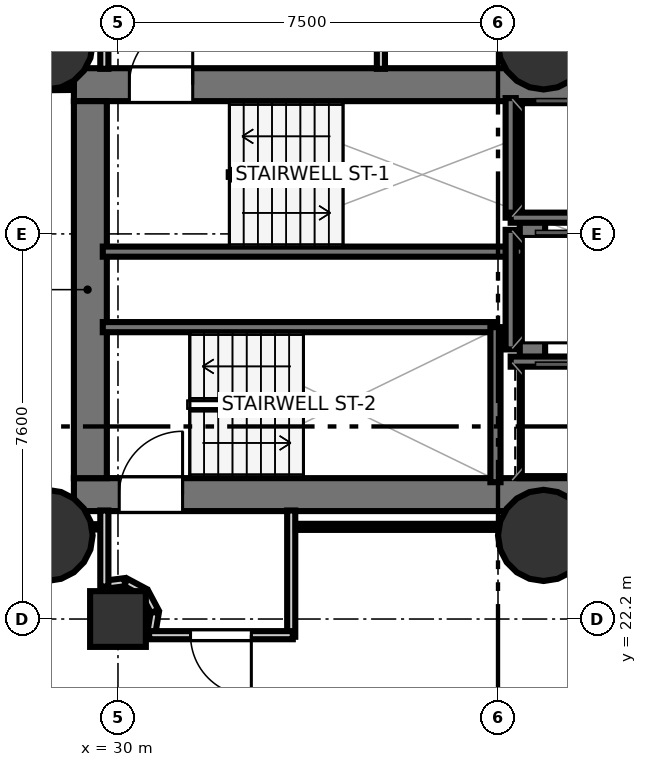
"""IFC4 building model, lengths in metres.
Left out: names, types, materials, properties, quantities, classifications, styles, units other than length and angle.
Written with IfcOpenShell. Run it as: python <this file> out.ifc"""

import sys

from ifc_helpers import new_model, si_unit, direction, frame, frame_2d, origin, origin_2d, place, context, subcontext, project, spatial, rectangle, hollow_circle, extrude, element, fill, save


model = new_model("IFC4")
c1 = context("Model", 3, precision=1e-05, world=origin(), true_north=direction((0.0, 1.0)))
c2 = subcontext(c1, "Body", "Model", "MODEL_VIEW")
j1 = project(units=[si_unit("LENGTHUNIT", "METRE"), si_unit("PLANEANGLEUNIT", "RADIAN")], contexts=[c1])
p1 = place(None, origin())
s1 = spatial("IfcSite", under=j1, at=p1, CompositionType="ELEMENT")
p2 = place(p1, origin())
s2 = spatial("IfcBuilding", under=s1, at=p2, CompositionType="ELEMENT")
p3 = place(p2, origin())
s3 = spatial("IfcBuildingStorey", under=s2, at=p3, CompositionType="ELEMENT", Elevation=0.0)
p4 = place(p3, frame((29.13, 32.745, 0.0), z_axis=(0.0, 0.0, 1.0), x_axis=(1.0, 0.0, 0.0)))
e1 = element("IfcWall", 1, at=p4, inside=s3, PredefinedType="SHEAR", context=c2, shape_type="SweptSolid", body=[
    extrude(rectangle(XDim=10.72, YDim=0.65, at=frame_2d((5.36, 0.0))), origin(), (0.0, 0.0, 1.0), 5.78),
])
p5 = place(p4, frame((1.095, 0.0, 0.0)))
e2 = element("IfcOpeningElement", 2, at=p5, cuts=e1, PredefinedType="OPENING", context=c2, shape_type="SweptSolid", body=[
    extrude(rectangle(XDim=1.25, YDim=2.15, at=frame_2d((0.625, 1.075))), frame((0.0, 0.335, 0.0), z_axis=(0.0, -1.0, 0.0), x_axis=(1.0, 0.0, 0.0)), (0.0, 0.0, 1.0), 0.67),
])
p6 = place(p3, frame((29.13, 24.655, 0.0), z_axis=(0.0, 0.0, 1.0), x_axis=(1.0, 0.0, 0.0)))
e3 = element("IfcWall", 3, at=p6, inside=s3, PredefinedType="SHEAR", context=c2, shape_type="SweptSolid", body=[
    extrude(rectangle(XDim=10.72, YDim=0.65, at=frame_2d((5.36, 0.0))), origin(), (0.0, 0.0, 1.0), 5.78),
])
p7 = place(p6, frame((0.895, 0.0, 0.0)))
e4 = element("IfcOpeningElement", 4, at=p7, cuts=e3, PredefinedType="OPENING", context=c2, shape_type="SweptSolid", body=[
    extrude(rectangle(XDim=1.25, YDim=2.15, at=frame_2d((0.625, 1.075))), frame((0.0, 0.335, 0.0), z_axis=(0.0, -1.0, 0.0), x_axis=(1.0, 0.0, 0.0)), (0.0, 0.0, 1.0), 0.67),
])
p8 = place(p3, frame((29.455, 24.98, 0.0), z_axis=(0.0, 0.0, 1.0), x_axis=(0.0, 1.0, 0.0)))
e5 = element("IfcWall", 5, at=p8, inside=s3, PredefinedType="SHEAR", context=c2, shape_type="SweptSolid", body=[
    extrude(rectangle(XDim=7.44, YDim=0.65, at=frame_2d((3.72, 0.0))), origin(), (0.0, 0.0, 1.0), 5.78),
])
p9 = place(p3, frame((38.18, 24.98, 0.0), z_axis=(0.0, 0.0, 1.0), x_axis=(0.0, 1.0, 0.0)))
e6 = element("IfcWall", 6, at=p9, inside=s3, PredefinedType="SHEAR", context=c2, shape_type="SweptSolid", body=[
    extrude(rectangle(XDim=7.44, YDim=0.5, at=frame_2d((3.72, 0.0))), origin(), (0.0, 0.0, 1.0), 5.78),
])
for number, where, z_axis, x_axis in (
    (7, (28.6, 33.55, 0.0), (0.0, 0.0, 1.0), (1.0, 0.0, 0.0)),
    (8, (28.6, 23.85, 0.0), (0.0, 0.0, 1.0), (1.0, 0.0, 0.0)),
    (9, (38.4, 33.55, 0.0), (0.0, 0.0, 1.0), (1.0, 0.0, 0.0)),
    (10, (38.4, 23.85, 0.0), (0.0, 0.0, 1.0), (1.0, 0.0, 0.0)),
):
    element("IfcColumn", number, at=place(p3, frame(where, z_axis=z_axis, x_axis=x_axis)), inside=s3, PredefinedType="COLUMN", context=c2, shape_type="SweptSolid", body=[
        extrude(hollow_circle(Radius=0.9, WallThickness=0.045, at=origin_2d()), origin(), (0.0, 0.0, 1.0), 6.0),
    ])
p10 = place(p3, frame((30.0, 22.2, 0.0), z_axis=(0.0, 0.0, 1.0), x_axis=(1.0, 0.0, 0.0)))
e11 = element("IfcColumn", 11, at=p10, inside=s3, PredefinedType="COLUMN", context=c2, shape_type="SweptSolid", body=[
    extrude(rectangle(XDim=1.1, YDim=1.1, at=origin_2d()), origin(), (0.0, 0.0, 1.0), 6.0),
])
p11 = place(p3, frame((29.7, 29.45, 0.0), z_axis=(0.0, 0.0, 1.0), x_axis=(1.0, 0.0, 0.0)))
e12 = element("IfcWall", 12, at=p11, inside=s3, PredefinedType="SOLIDWALL", context=c2, shape_type="SweptSolid", body=[
    extrude(rectangle(XDim=8.3, YDim=0.2, at=frame_2d((4.15, 0.0))), origin(), (0.0, 0.0, 1.0), 5.78),
])
p12 = place(p3, frame((29.7, 27.96, 0.0), z_axis=(0.0, 0.0, 1.0), x_axis=(1.0, 0.0, 0.0)))
e13 = element("IfcWall", 13, at=p12, inside=s3, PredefinedType="SOLIDWALL", context=c2, shape_type="SweptSolid", body=[
    extrude(rectangle(XDim=7.75, YDim=0.2, at=frame_2d((3.875, 0.0))), origin(), (0.0, 0.0, 1.0), 5.78),
])
p13 = place(p3, frame((37.45, 24.9, 0.0), z_axis=(0.0, 0.0, 1.0), x_axis=(0.0, 1.0, 0.0)))
e14 = element("IfcWall", 14, at=p13, inside=s3, PredefinedType="SOLIDWALL", context=c2, shape_type="SweptSolid", body=[
    extrude(rectangle(XDim=3.06, YDim=0.2, at=frame_2d((1.53, 0.0))), origin(), (0.0, 0.0, 1.0), 5.78),
])
p14 = place(p3, frame((37.75, 30.12, 0.0), z_axis=(0.0, 0.0, 1.0), x_axis=(0.0, 1.0, 0.0)))
e15 = element("IfcWall", 15, at=p14, inside=s3, PredefinedType="SOLIDWALL", context=c2, shape_type="SweptSolid", body=[
    extrude(rectangle(XDim=2.36, YDim=0.2, at=frame_2d((1.18, 0.0))), origin(), (0.0, 0.0, 1.0), 5.78),
])
for number, where, z_axis, x_axis in (
    (16, (37.75, 30.12, 0.0), (0.0, 0.0, 1.0), (1.0, 0.0, 0.0)),
    (17, (37.75, 27.28, 0.0), (0.0, 0.0, 1.0), (1.0, 0.0, 0.0)),
):
    element("IfcWall", number, at=place(p3, frame(where, z_axis=z_axis, x_axis=x_axis)), inside=s3, PredefinedType="SOLIDWALL", context=c2, shape_type="SweptSolid", body=[
        extrude(rectangle(XDim=2.1, YDim=0.2, at=frame_2d((1.05, 0.0))), origin(), (0.0, 0.0, 1.0), 5.78),
    ])
p15 = place(p3, frame((37.75, 27.52, 0.0), z_axis=(0.0, 0.0, 1.0), x_axis=(0.0, 1.0, 0.0)))
e18 = element("IfcWall", 18, at=p15, inside=s3, PredefinedType="SOLIDWALL", context=c2, shape_type="SweptSolid", body=[
    extrude(rectangle(XDim=2.36, YDim=0.2, at=frame_2d((1.18, 0.0))), origin(), (0.0, 0.0, 1.0), 5.78),
])
for number, where, z_axis, x_axis in (
    (19, (29.731, 33.058, 0.0), (0.0, 0.0, 1.0), (0.0, 1.0, 0.0)),
    (20, (35.189, 38.1, 0.0), (0.0, 0.0, 1.0), (0.0, -1.0, 0.0)),
):
    element("IfcWall", number, at=place(p3, frame(where, z_axis=z_axis, x_axis=x_axis)), inside=s3, PredefinedType="PARTITIONING", context=c2, shape_type="SweptSolid", body=[
        extrude(rectangle(XDim=5.042, YDim=0.16, at=frame_2d((2.521, 0.0))), origin(), (0.0, 0.0, 1.0), 5.1),
    ])
p16 = place(p3, frame((30.645, 21.845, 0.0), z_axis=(0.0, 0.0, 1.0), x_axis=(0.16559769087, 0.986193391165, 0.0)))
e21 = element("IfcWall", 21, at=p16, inside=s3, PredefinedType="PARTITIONING", context=c2, shape_type="SweptSolid", body=[
    extrude(rectangle(XDim=0.495, YDim=0.16, at=frame_2d((0.248, 0.0))), origin(), (0.0, 0.0, 1.0), 5.1),
])
p17 = place(p3, frame((30.724, 22.353, 0.0), z_axis=(0.0, 0.0, 1.0), x_axis=(-0.471202615726, 0.882024996773, 0.0)))
e22 = element("IfcWall", 22, at=p17, inside=s3, PredefinedType="PARTITIONING", context=c2, shape_type="SweptSolid", body=[
    extrude(rectangle(XDim=0.412, YDim=0.16, at=frame_2d((0.206, 0.0))), origin(), (0.0, 0.0, 1.0), 5.1),
])
p18 = place(p3, frame((30.517, 22.729, 0.0), z_axis=(0.0, 0.0, 1.0), x_axis=(-0.882139655073, 0.470987928665, 0.0)))
e23 = element("IfcWall", 23, at=p18, inside=s3, PredefinedType="PARTITIONING", context=c2, shape_type="SweptSolid", body=[
    extrude(rectangle(XDim=0.412, YDim=0.16, at=frame_2d((0.206, 0.0))), origin(), (0.0, 0.0, 1.0), 5.1),
])
p19 = place(p3, frame((30.135, 22.927, 0.0), z_axis=(0.0, 0.0, 1.0), x_axis=(-0.992106976416, -0.125394367286, 0.0)))
e24 = element("IfcWall", 24, at=p19, inside=s3, PredefinedType="PARTITIONING", context=c2, shape_type="SweptSolid", body=[
    extrude(rectangle(XDim=0.442, YDim=0.16, at=frame_2d((0.221, 0.0))), origin(), (0.0, 0.0, 1.0), 5.1),
])
p20 = place(p3, frame((29.731, 22.841, 0.0), z_axis=(0.0, 0.0, 1.0), x_axis=(0.0, 1.0, 0.0)))
e25 = element("IfcWall", 25, at=p20, inside=s3, PredefinedType="PARTITIONING", context=c2, shape_type="SweptSolid", body=[
    extrude(rectangle(XDim=1.501, YDim=0.16, at=frame_2d((0.75, 0.0))), origin(), (0.0, 0.0, 1.0), 5.1),
])
p21 = place(p3, frame((33.419, 24.342, 0.0), z_axis=(0.0, 0.0, 1.0), x_axis=(0.0, -1.0, 0.0)))
e26 = element("IfcWall", 26, at=p21, inside=s3, PredefinedType="PARTITIONING", context=c2, shape_type="SweptSolid", body=[
    extrude(rectangle(XDim=2.492, YDim=0.16, at=frame_2d((1.246, 0.0))), origin(), (0.0, 0.0, 1.0), 5.1),
])
p22 = place(p3, frame((33.45, 21.881, 0.0), z_axis=(0.0, 0.0, 1.0), x_axis=(-1.0, 0.0, 0.0)))
e27 = element("IfcWall", 27, at=p22, inside=s3, PredefinedType="PARTITIONING", context=c2, shape_type="SweptSolid", body=[
    extrude(rectangle(XDim=2.836, YDim=0.16, at=frame_2d((1.418, 0.0))), origin(), (0.0, 0.0, 1.0), 5.1),
])
p23 = place(p22, frame((0.818, 0.0, 0.0)))
e28 = element("IfcOpeningElement", 28, at=p23, cuts=e27, PredefinedType="OPENING", context=c2, shape_type="SweptSolid", body=[
    extrude(rectangle(XDim=1.2, YDim=2.15, at=frame_2d((0.6, 1.075))), frame((0.0, 0.09, 0.0), z_axis=(0.0, -1.0, 0.0), x_axis=(1.0, 0.0, 0.0)), (0.0, 0.0, 1.0), 0.18),
])
p24 = place(p3, frame((29.13, 32.701, 0.0), z_axis=(0.0, 0.0, 1.0), x_axis=(-0.999941987134, -0.010771367904, 0.0)))
e29 = element("IfcWall", 29, at=p24, inside=s3, PredefinedType="PARTITIONING", context=c2, shape_type="SweptSolid", body=[
    extrude(rectangle(XDim=0.68, YDim=0.12, at=frame_2d((0.34, 0.0))), origin(), (0.0, 0.0, 1.0), 5.1),
])
p25 = place(p3, frame((28.48, 24.019, 0.0), z_axis=(0.0, 0.0, 1.0), x_axis=(1.0, 0.0, 0.0)))
e30 = element("IfcWall", 30, at=p25, inside=s3, PredefinedType="PARTITIONING", context=c2, shape_type="SweptSolid", body=[
    extrude(rectangle(XDim=1.158, YDim=0.105, at=frame_2d((0.579, 0.0))), origin(), (0.0, 0.0, 1.0), 5.1),
])
p26 = place(p3, frame((33.512, 24.019, 0.0), z_axis=(0.0, 0.0, 1.0), x_axis=(1.0, 0.0, 0.0)))
e31 = element("IfcWall", 31, at=p26, inside=s3, PredefinedType="PARTITIONING", context=c2, shape_type="SweptSolid", body=[
    extrude(rectangle(XDim=6.308, YDim=0.12, at=frame_2d((3.154, 0.0))), origin(), (0.0, 0.0, 1.0), 5.1),
])
p27 = place(p5, origin())
e32 = element("IfcDoor", 32, at=p27, inside=s3, OperationType="SINGLE_SWING_RIGHT", PredefinedType="DOOR", context=c2, shape_type="SweptSolid", body=[
    extrude(rectangle(XDim=1.25, YDim=2.15, at=frame_2d((0.625, 1.075))), frame((0.0, 0.025, 0.0), z_axis=(0.0, -1.0, 0.0), x_axis=(1.0, 0.0, 0.0)), (0.0, 0.0, 1.0), 0.05),
])
fill(e2, e32)
p28 = place(p7, origin())
e33 = element("IfcDoor", 33, at=p28, inside=s3, OperationType="SINGLE_SWING_RIGHT", PredefinedType="DOOR", context=c2, shape_type="SweptSolid", body=[
    extrude(rectangle(XDim=1.25, YDim=2.15, at=frame_2d((0.625, 1.075))), frame((0.0, 0.025, 0.0), z_axis=(0.0, -1.0, 0.0), x_axis=(1.0, 0.0, 0.0)), (0.0, 0.0, 1.0), 0.05),
])
fill(e4, e33)
p29 = place(p23, origin())
e34 = element("IfcDoor", 34, at=p29, inside=s3, OperationType="SINGLE_SWING_LEFT", PredefinedType="DOOR", context=c2, shape_type="SweptSolid", body=[
    extrude(rectangle(XDim=1.2, YDim=2.15, at=frame_2d((0.6, 1.075))), frame((0.0, 0.025, 0.0), z_axis=(0.0, -1.0, 0.0), x_axis=(1.0, 0.0, 0.0)), (0.0, 0.0, 1.0), 0.05),
])
fill(e28, e34)
save(model, sys.argv[1])
